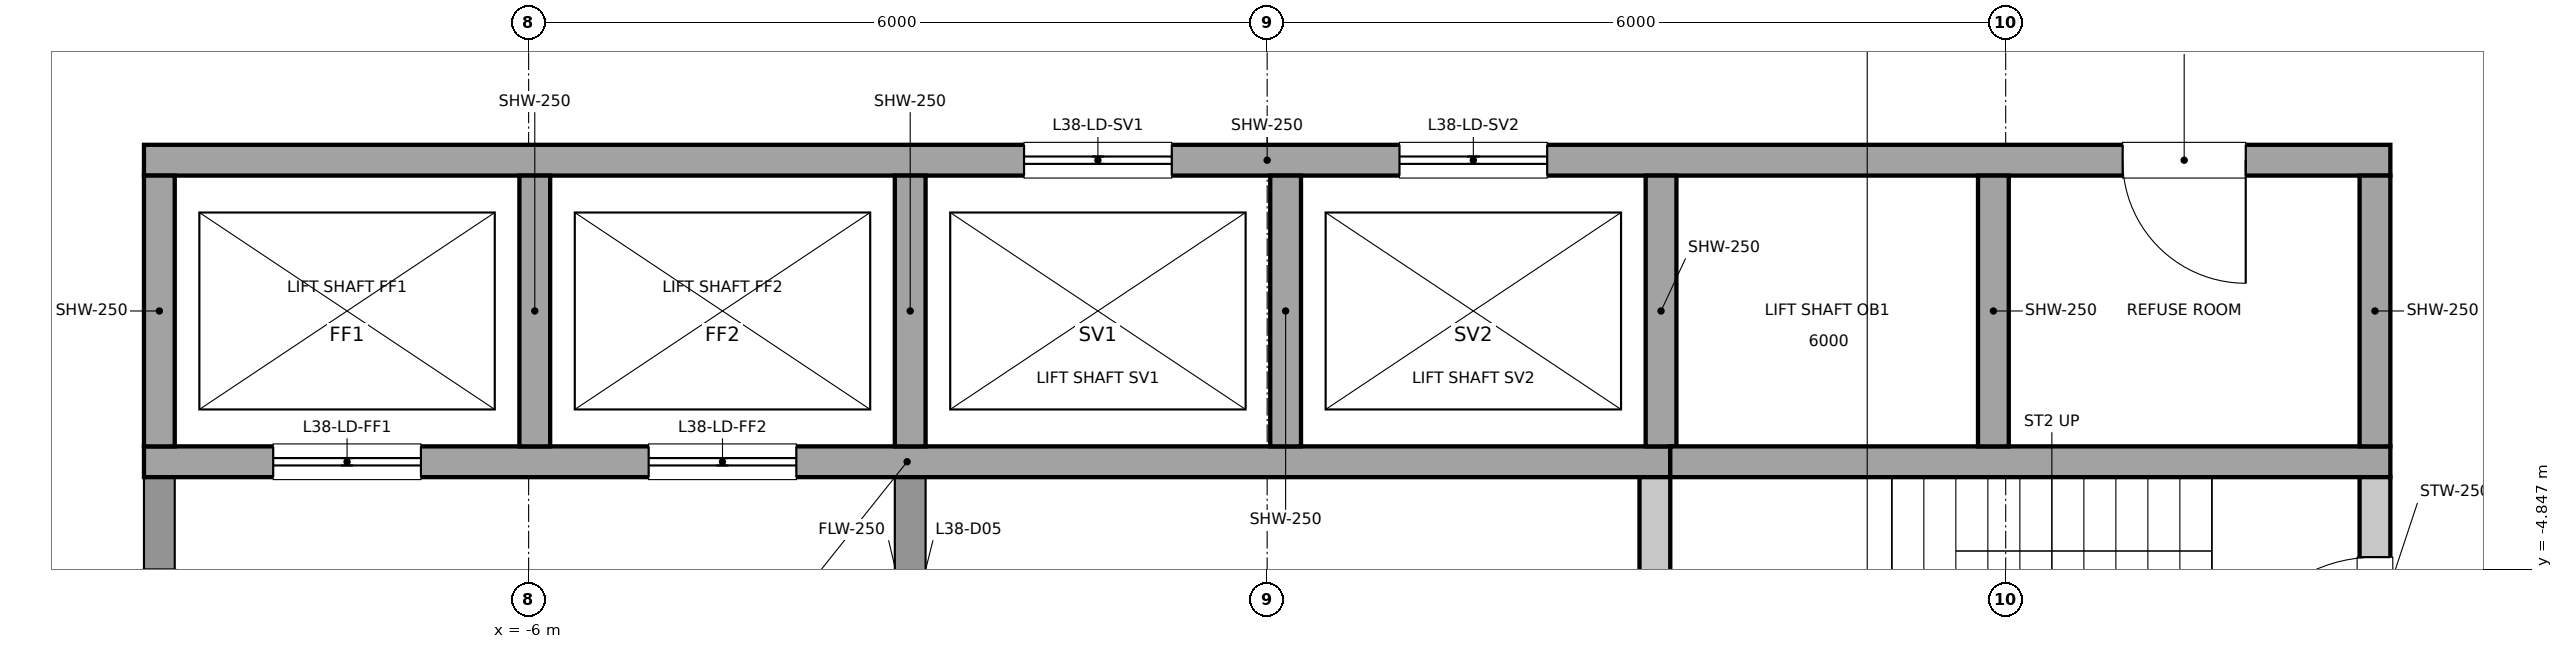
"""IFC4 building model, lengths in metres.
Left out: names, types, materials, properties, quantities, classifications, styles, units other than length and angle.
Written with IfcOpenShell. Run it as: python <this file> out.ifc"""

import sys

from ifc_helpers import new_model, si_unit, direction, frame, frame_2d, origin, place, context, subcontext, project, spatial, rectangle, extrude, element, fill, save


model = new_model("IFC4")
c1 = context("Model", 3, precision=1e-05, world=origin(), true_north=direction((0.0, 1.0)))
c2 = subcontext(c1, "Body", "Model", "MODEL_VIEW")
j1 = project(units=[si_unit("LENGTHUNIT", "METRE"), si_unit("PLANEANGLEUNIT", "RADIAN")], contexts=[c1])
p1 = place(None, origin())
s1 = spatial("IfcSite", under=j1, at=p1, CompositionType="ELEMENT")
p2 = place(p1, origin())
s2 = spatial("IfcBuilding", under=s1, at=p2, CompositionType="ELEMENT")
p3 = place(p2, frame((0.0, 0.0, 181.6)))
s3 = spatial("IfcBuildingStorey", under=s2, at=p3, CompositionType="ELEMENT", Elevation=181.6)
p4 = place(p3, frame((9.0, -6.6, 0.0), z_axis=(0.0, 0.0, 1.0), x_axis=(0.0, 1.0, 0.0)))
e1 = element("IfcWall", 1, at=p4, inside=s3, PredefinedType="SOLIDWALL", context=c2, shape_type="SweptSolid", body=[
    extrude(rectangle(XDim=2.5, YDim=0.25, at=frame_2d((1.25, 0.0))), origin(), (0.0, 0.0, 1.0), 3.85),
])
p5 = place(p4, frame((0.65, 0.0, 0.0)))
e2 = element("IfcOpeningElement", 2, at=p5, cuts=e1, PredefinedType="OPENING", context=c2, shape_type="SweptSolid", body=[
    extrude(rectangle(XDim=1.2, YDim=2.1, at=frame_2d((0.6, 1.05))), frame((0.0, 0.125, 0.0), z_axis=(0.0, -1.0, 0.0), x_axis=(1.0, 0.0, 0.0)), (0.0, 0.0, 1.0), 0.25),
])
p6 = place(p3, frame((-9.0, -6.6, 0.0), z_axis=(0.0, 0.0, 1.0), x_axis=(0.0, 1.0, 0.0)))
e3 = element("IfcWall", 3, at=p6, inside=s3, PredefinedType="PARTITIONING", context=c2, shape_type="SweptSolid", body=[
    extrude(rectangle(XDim=2.5, YDim=0.25, at=frame_2d((1.25, 0.0))), origin(), (0.0, 0.0, 1.0), 3.85),
])
p7 = place(p6, frame((0.75, 0.0, 0.0)))
e4 = element("IfcOpeningElement", 4, at=p7, cuts=e3, PredefinedType="OPENING", context=c2, shape_type="SweptSolid", body=[
    extrude(rectangle(XDim=1.0, YDim=2.1, at=frame_2d((0.5, 1.05))), frame((0.0, 0.125, 0.0), z_axis=(0.0, -1.0, 0.0), x_axis=(1.0, 0.0, 0.0)), (0.0, 0.0, 1.0), 0.25),
])
p8 = place(p3, frame((3.15, -6.6, 0.0), z_axis=(0.0, 0.0, 1.0), x_axis=(0.0, 1.0, 0.0)))
e5 = element("IfcWall", 5, at=p8, inside=s3, PredefinedType="SOLIDWALL", context=c2, shape_type="SweptSolid", body=[
    extrude(rectangle(XDim=2.5, YDim=0.25, at=frame_2d((1.25, 0.0))), origin(), (0.0, 0.0, 1.0), 3.85),
])
p9 = place(p3, frame((-2.9, -6.6, 0.0), z_axis=(0.0, 0.0, 1.0), x_axis=(0.0, 1.0, 0.0)))
e6 = element("IfcWall", 6, at=p9, inside=s3, PredefinedType="PARTITIONING", context=c2, shape_type="SweptSolid", body=[
    extrude(rectangle(XDim=2.5, YDim=0.25, at=frame_2d((1.25, 0.0))), origin(), (0.0, 0.0, 1.0), 3.85),
])
p10 = place(p9, frame((0.8, 0.0, 0.0)))
e7 = element("IfcOpeningElement", 7, at=p10, cuts=e6, PredefinedType="OPENING", context=c2, shape_type="SweptSolid", body=[
    extrude(rectangle(XDim=0.9, YDim=2.1, at=frame_2d((0.45, 1.05))), frame((0.0, 0.125, 0.0), z_axis=(0.0, -1.0, 0.0), x_axis=(1.0, 0.0, 0.0)), (0.0, 0.0, 1.0), 0.25),
])
p11 = place(p3, frame((-9.125, -1.525, 0.0), z_axis=(0.0, 0.0, 1.0), x_axis=(1.0, 0.0, 0.0)))
e8 = element("IfcWall", 8, at=p11, inside=s3, PredefinedType="SOLIDWALL", context=c2, shape_type="SweptSolid", body=[
    extrude(rectangle(XDim=18.25, YDim=0.25, at=frame_2d((9.125, 0.0))), origin(), (0.0, 0.0, 1.0), 3.85),
])
p12 = place(p11, frame((7.15, 0.0, 0.0)))
e9 = element("IfcOpeningElement", 9, at=p12, cuts=e8, PredefinedType="OPENING", context=c2, shape_type="SweptSolid", body=[
    extrude(rectangle(XDim=1.2, YDim=2.1, at=frame_2d((0.6, 1.05))), frame((0.0, 0.125, 0.0), z_axis=(0.0, -1.0, 0.0), x_axis=(1.0, 0.0, 0.0)), (0.0, 0.0, 1.0), 0.25),
])
p13 = place(p11, frame((10.2, 0.0, 0.0)))
e10 = element("IfcOpeningElement", 10, at=p13, cuts=e8, PredefinedType="OPENING", context=c2, shape_type="SweptSolid", body=[
    extrude(rectangle(XDim=1.2, YDim=2.1, at=frame_2d((0.6, 1.05))), frame((0.0, 0.125, 0.0), z_axis=(0.0, -1.0, 0.0), x_axis=(1.0, 0.0, 0.0)), (0.0, 0.0, 1.0), 0.25),
])
p14 = place(p11, frame((16.075, 0.0, 0.0)))
e11 = element("IfcOpeningElement", 11, at=p14, cuts=e8, PredefinedType="OPENING", context=c2, shape_type="SweptSolid", body=[
    extrude(rectangle(XDim=1.0, YDim=2.1, at=frame_2d((0.5, 1.05))), frame((0.0, 0.125, 0.0), z_axis=(0.0, -1.0, 0.0), x_axis=(1.0, 0.0, 0.0)), (0.0, 0.0, 1.0), 0.25),
])
p15 = place(p3, frame((-9.125, -3.975, 0.0), z_axis=(0.0, 0.0, 1.0), x_axis=(1.0, 0.0, 0.0)))
e12 = element("IfcWall", 12, at=p15, inside=s3, PredefinedType="SOLIDWALL", context=c2, shape_type="SweptSolid", body=[
    extrude(rectangle(XDim=12.4, YDim=0.25, at=frame_2d((6.2, 0.0))), origin(), (0.0, 0.0, 1.0), 3.85),
])
p16 = place(p15, frame((1.05, 0.0, 0.0)))
e13 = element("IfcOpeningElement", 13, at=p16, cuts=e12, PredefinedType="OPENING", context=c2, shape_type="SweptSolid", body=[
    extrude(rectangle(XDim=1.2, YDim=2.1, at=frame_2d((0.6, 1.05))), frame((0.0, 0.125, 0.0), z_axis=(0.0, -1.0, 0.0), x_axis=(1.0, 0.0, 0.0)), (0.0, 0.0, 1.0), 0.25),
])
p17 = place(p15, frame((4.1, 0.0, 0.0)))
e14 = element("IfcOpeningElement", 14, at=p17, cuts=e12, PredefinedType="OPENING", context=c2, shape_type="SweptSolid", body=[
    extrude(rectangle(XDim=1.2, YDim=2.1, at=frame_2d((0.6, 1.05))), frame((0.0, 0.125, 0.0), z_axis=(0.0, -1.0, 0.0), x_axis=(1.0, 0.0, 0.0)), (0.0, 0.0, 1.0), 0.25),
])
p18 = place(p3, frame((3.275, -3.975, 0.0), z_axis=(0.0, 0.0, 1.0), x_axis=(1.0, 0.0, 0.0)))
e15 = element("IfcWall", 15, at=p18, inside=s3, PredefinedType="SOLIDWALL", context=c2, shape_type="SweptSolid", body=[
    extrude(rectangle(XDim=5.85, YDim=0.25, at=frame_2d((2.925, 0.0))), origin(), (0.0, 0.0, 1.0), 3.85),
])
for number, where, z_axis, x_axis in (
    (16, (-9.0, -3.85, 0.0), (0.0, 0.0, 1.0), (0.0, 1.0, 0.0)),
    (17, (-5.95, -3.85, 0.0), (0.0, 0.0, 1.0), (0.0, 1.0, 0.0)),
    (18, (-2.9, -3.85, 0.0), (0.0, 0.0, 1.0), (0.0, 1.0, 0.0)),
    (19, (0.15, -3.85, 0.0), (0.0, 0.0, 1.0), (0.0, 1.0, 0.0)),
    (20, (3.2, -3.85, 0.0), (0.0, 0.0, 1.0), (0.0, 1.0, 0.0)),
    (21, (5.9, -3.85, 0.0), (0.0, 0.0, 1.0), (0.0, 1.0, 0.0)),
    (22, (9.0, -3.85, 0.0), (0.0, 0.0, 1.0), (0.0, 1.0, 0.0)),
):
    element("IfcWall", number, at=place(p3, frame(where, z_axis=z_axis, x_axis=x_axis)), inside=s3, PredefinedType="SOLIDWALL", context=c2, shape_type="SweptSolid", body=[
        extrude(rectangle(XDim=2.2, YDim=0.25, at=frame_2d((1.1, 0.0))), origin(), (0.0, 0.0, 1.0), 3.85),
    ])
p19 = place(p16, origin())
e23 = element("IfcDoor", 23, at=p19, inside=s3, OperationType="DOUBLE_DOOR_SLIDING", PredefinedType="DOOR", context=c2, shape_type="SweptSolid", body=[
    extrude(rectangle(XDim=1.2, YDim=2.1, at=frame_2d((0.6, 1.05))), frame((0.0, 0.025, 0.0), z_axis=(0.0, -1.0, 0.0), x_axis=(1.0, 0.0, 0.0)), (0.0, 0.0, 1.0), 0.05),
])
fill(e13, e23)
p20 = place(p17, origin())
e24 = element("IfcDoor", 24, at=p20, inside=s3, OperationType="DOUBLE_DOOR_SLIDING", PredefinedType="DOOR", context=c2, shape_type="SweptSolid", body=[
    extrude(rectangle(XDim=1.2, YDim=2.1, at=frame_2d((0.6, 1.05))), frame((0.0, 0.025, 0.0), z_axis=(0.0, -1.0, 0.0), x_axis=(1.0, 0.0, 0.0)), (0.0, 0.0, 1.0), 0.05),
])
fill(e14, e24)
p21 = place(p12, origin())
e25 = element("IfcDoor", 25, at=p21, inside=s3, OperationType="DOUBLE_DOOR_SLIDING", PredefinedType="DOOR", context=c2, shape_type="SweptSolid", body=[
    extrude(rectangle(XDim=1.2, YDim=2.1, at=frame_2d((0.6, 1.05))), frame((0.0, 0.025, 0.0), z_axis=(0.0, -1.0, 0.0), x_axis=(1.0, 0.0, 0.0)), (0.0, 0.0, 1.0), 0.05),
])
fill(e9, e25)
p22 = place(p13, origin())
e26 = element("IfcDoor", 26, at=p22, inside=s3, OperationType="DOUBLE_DOOR_SLIDING", PredefinedType="DOOR", context=c2, shape_type="SweptSolid", body=[
    extrude(rectangle(XDim=1.2, YDim=2.1, at=frame_2d((0.6, 1.05))), frame((0.0, 0.025, 0.0), z_axis=(0.0, -1.0, 0.0), x_axis=(1.0, 0.0, 0.0)), (0.0, 0.0, 1.0), 0.05),
])
fill(e10, e26)
p23 = place(p5, origin())
e27 = element("IfcDoor", 27, at=p23, inside=s3, OperationType="SINGLE_SWING_LEFT", PredefinedType="DOOR", context=c2, shape_type="SweptSolid", body=[
    extrude(rectangle(XDim=1.2, YDim=2.1, at=frame_2d((0.6, 1.05))), frame((0.0, 0.025, 0.0), z_axis=(0.0, -1.0, 0.0), x_axis=(1.0, 0.0, 0.0)), (0.0, 0.0, 1.0), 0.05),
])
fill(e2, e27)
p24 = place(p14, origin())
e28 = element("IfcDoor", 28, at=p24, inside=s3, OperationType="SINGLE_SWING_RIGHT", PredefinedType="DOOR", context=c2, shape_type="SweptSolid", body=[
    extrude(rectangle(XDim=1.0, YDim=2.1, at=frame_2d((0.5, 1.05))), frame((0.0, 0.025, 0.0), z_axis=(0.0, -1.0, 0.0), x_axis=(1.0, 0.0, 0.0)), (0.0, 0.0, 1.0), 0.05),
])
fill(e11, e28)
save(model, sys.argv[1])
